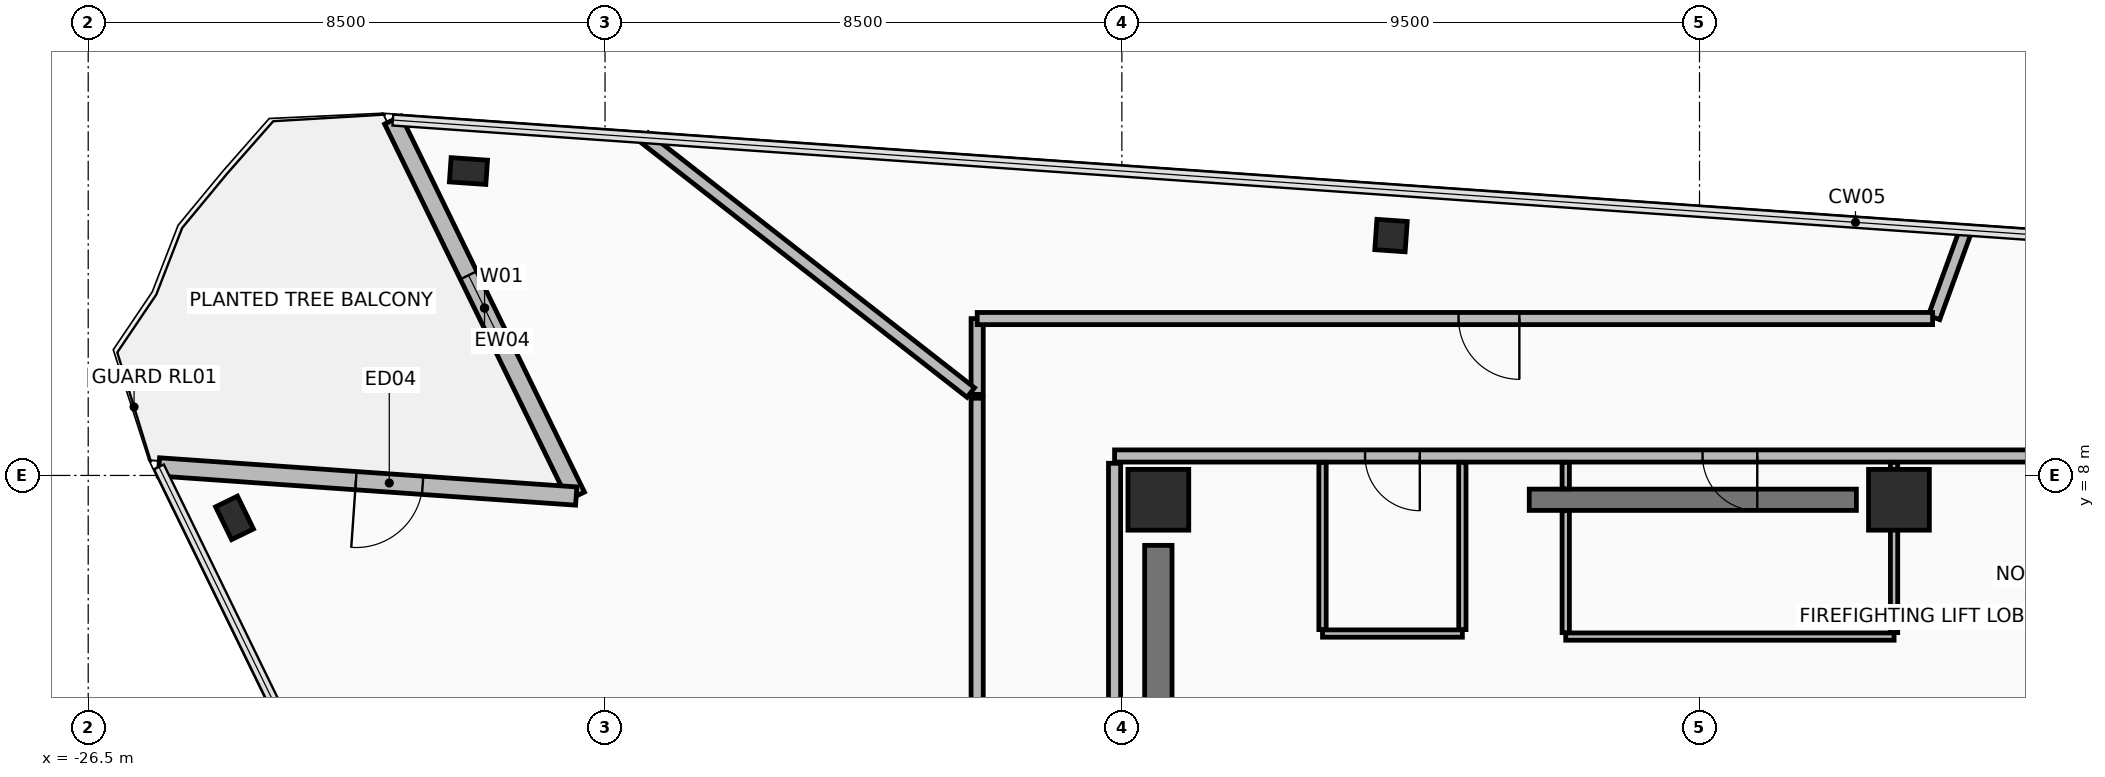
"""IFC4 building model, lengths in metres.
Left out: names, types, materials, properties, quantities, classifications, styles, units other than length and angle.
Written with IfcOpenShell. Run it as: python <this file> out.ifc"""

import sys

from ifc_helpers import new_model, si_unit, direction, frame, frame_2d, origin, origin_2d, place, context, subcontext, project, spatial, rectangle, hollow_rectangle, extrude, element, fill, save


model = new_model("IFC4")
c1 = context("Model", 3, precision=1e-05, world=origin(), true_north=direction((0.0, 1.0)))
c2 = subcontext(c1, "Body", "Model", "MODEL_VIEW")
j1 = project(units=[si_unit("LENGTHUNIT", "METRE"), si_unit("PLANEANGLEUNIT", "RADIAN")], contexts=[c1])
p1 = place(None, origin())
s1 = spatial("IfcSite", under=j1, at=p1, CompositionType="ELEMENT")
p2 = place(p1, origin())
s2 = spatial("IfcBuilding", under=s1, at=p2, CompositionType="ELEMENT")
p3 = place(p2, frame((0.0, 0.0, 230.65)))
s3 = spatial("IfcBuildingStorey", under=s2, at=p3, CompositionType="ELEMENT", Elevation=230.65)
for number, where, z_axis, x_axis in (
    (1, (3.28, 7.6, 0.0), (0.0, 0.0, 1.0), (1.0, 0.0, 0.0)),
    (2, (-8.9, 7.6, 0.0), (0.0, 0.0, 1.0), (1.0, 0.0, 0.0)),
):
    element("IfcColumn", number, at=place(p3, frame(where, z_axis=z_axis, x_axis=x_axis)), inside=s3, PredefinedType="COLUMN", context=c2, shape_type="SweptSolid", body=[
        extrude(rectangle(XDim=1.0, YDim=1.0, at=origin_2d()), origin(), (0.0, 0.0, 1.0), 3.6),
    ])
p4 = place(p3, frame((-24.094, 7.302, 0.0), z_axis=(0.0, 0.0, 1.0), x_axis=(-0.438371146789, 0.898794046299, 0.0)))
e3 = element("IfcColumn", 3, at=p4, inside=s3, PredefinedType="COLUMN", context=c2, shape_type="SweptSolid", body=[
    extrude(hollow_rectangle(XDim=0.4, YDim=0.6, WallThickness=0.03, at=origin_2d()), origin(), (0.0, 0.0, 1.0), 3.6),
])
p5 = place(p3, frame((-5.073, 11.945, 0.0), z_axis=(0.0, 0.0, 1.0), x_axis=(-0.99756405026, 0.069756473744, 0.0)))
e4 = element("IfcColumn", 4, at=p5, inside=s3, PredefinedType="COLUMN", context=c2, shape_type="SweptSolid", body=[
    extrude(hollow_rectangle(XDim=0.5, YDim=0.5, WallThickness=0.032, at=origin_2d()), origin(), (0.0, 0.0, 1.0), 3.6),
])
p6 = place(p3, frame((-20.246, 13.006, 0.0), z_axis=(0.0, 0.0, 1.0), x_axis=(-0.99756405026, 0.069756473744, 0.0)))
e5 = element("IfcColumn", 5, at=p6, inside=s3, PredefinedType="COLUMN", context=c2, shape_type="SweptSolid", body=[
    extrude(hollow_rectangle(XDim=0.4, YDim=0.6, WallThickness=0.03, at=origin_2d()), origin(), (0.0, 0.0, 1.0), 3.6),
])
p7 = place(p3, frame((-21.49, 13.844, 0.0), z_axis=(0.0, 0.0, 1.0), x_axis=(0.438391471143, -0.898784133165, 0.0)))
e6 = element("IfcWall", 6, at=p7, inside=s3, PredefinedType="STANDARD", context=c2, shape_type="SweptSolid", body=[
    extrude(rectangle(XDim=6.88, YDim=0.3, at=frame_2d((3.44, 0.0))), origin(), (0.0, 0.0, 1.0), 2.765),
])
p8 = place(p7, frame((2.84, 0.0, 0.485)))
e7 = element("IfcOpeningElement", 7, at=p8, cuts=e6, PredefinedType="OPENING", context=c2, shape_type="SweptSolid", body=[
    extrude(rectangle(XDim=1.2, YDim=2.1, at=frame_2d((0.6, 1.05))), frame((0.0, 0.16, 0.0), z_axis=(0.0, -1.0, 0.0), x_axis=(1.0, 0.0, 0.0)), (0.0, 0.0, 1.0), 0.32),
])
p9 = place(p3, frame((-18.474, 7.661, 0.0), z_axis=(0.0, 0.0, 1.0), x_axis=(-0.997565982203, 0.069728840176, 0.0)))
e8 = element("IfcWall", 8, at=p9, inside=s3, PredefinedType="STANDARD", context=c2, shape_type="SweptSolid", body=[
    extrude(rectangle(XDim=6.88, YDim=0.3, at=frame_2d((3.44, 0.0))), origin(), (0.0, 0.0, 1.0), 2.765),
])
p10 = place(p9, frame((2.532, 0.0, 0.0)))
e9 = element("IfcOpeningElement", 9, at=p10, cuts=e8, PredefinedType="OPENING", context=c2, shape_type="SweptSolid", body=[
    extrude(rectangle(XDim=1.1, YDim=2.2, at=frame_2d((0.55, 1.1))), frame((0.0, 0.16, 0.0), z_axis=(0.0, -1.0, 0.0), x_axis=(1.0, 0.0, 0.0)), (0.0, 0.0, 1.0), 0.32),
])
p11 = place(p3, frame((-2.8, 7.6, 0.0), z_axis=(0.0, 0.0, 1.0), x_axis=(1.0, 0.0, 0.0)))
e10 = element("IfcWall", 10, at=p11, inside=s3, PredefinedType="SHEAR", context=c2, shape_type="SweptSolid", body=[
    extrude(rectangle(XDim=5.38, YDim=0.35, at=frame_2d((2.69, 0.0))), origin(), (0.0, 0.0, 1.0), 3.42),
])
p12 = place(p3, frame((-8.9, -3.85, 0.0), z_axis=(0.0, 0.0, 1.0), x_axis=(0.0, 1.0, 0.0)))
e11 = element("IfcWall", 11, at=p12, inside=s3, PredefinedType="SHEAR", context=c2, shape_type="SweptSolid", body=[
    extrude(rectangle(XDim=10.7, YDim=0.45, at=frame_2d((5.35, 0.0))), origin(), (0.0, 0.0, 1.0), 3.42),
])
p13 = place(p3, frame((9.62, 8.32, 0.0), z_axis=(0.0, 0.0, 1.0), x_axis=(-1.0, 0.0, 0.0)))
e12 = element("IfcWall", 12, at=p13, inside=s3, PredefinedType="PARTITIONING", context=c2, shape_type="SweptSolid", body=[
    extrude(rectangle(XDim=19.24, YDim=0.2, at=frame_2d((9.62, 0.0))), origin(), (0.0, 0.0, 1.0), 2.915),
])
p14 = place(p13, frame((8.67, 0.0, 0.0)))
e13 = element("IfcOpeningElement", 13, at=p14, cuts=e12, PredefinedType="OPENING", context=c2, shape_type="SweptSolid", body=[
    extrude(rectangle(XDim=0.9, YDim=2.1, at=frame_2d((0.45, 1.05))), frame((0.0, 0.11, 0.0), z_axis=(0.0, -1.0, 0.0), x_axis=(1.0, 0.0, 0.0)), (0.0, 0.0, 1.0), 0.22),
])
p15 = place(p13, frame((14.22, 0.0, 0.0)))
e14 = element("IfcOpeningElement", 14, at=p15, cuts=e12, PredefinedType="OPENING", context=c2, shape_type="SweptSolid", body=[
    extrude(rectangle(XDim=0.9, YDim=2.1, at=frame_2d((0.45, 1.05))), frame((0.0, 0.11, 0.0), z_axis=(0.0, -1.0, 0.0), x_axis=(1.0, 0.0, 0.0)), (0.0, 0.0, 1.0), 0.22),
])
p16 = place(p3, frame((-9.62, 8.2, 0.0), z_axis=(0.0, 0.0, 1.0), x_axis=(0.0, -1.0, 0.0)))
e15 = element("IfcWall", 15, at=p16, inside=s3, PredefinedType="PARTITIONING", context=c2, shape_type="SweptSolid", body=[
    extrude(rectangle(XDim=16.4, YDim=0.2, at=frame_2d((8.2, 0.0))), origin(), (0.0, 0.0, 1.0), 2.765),
])
p17 = place(p16, frame((12.65, 0.0, 0.0)))
e16 = element("IfcOpeningElement", 16, at=p17, cuts=e15, PredefinedType="OPENING", context=c2, shape_type="SweptSolid", body=[
    extrude(rectangle(XDim=1.1, YDim=2.15, at=frame_2d((0.55, 1.075))), frame((0.0, 0.11, 0.0), z_axis=(0.0, -1.0, 0.0), x_axis=(1.0, 0.0, 0.0)), (0.0, 0.0, 1.0), 0.22),
])
p18 = place(p3, frame((-2.2, 5.35, 0.0), z_axis=(0.0, 0.0, 1.0), x_axis=(1.0, 0.0, 0.0)))
e17 = element("IfcWall", 17, at=p18, inside=s3, PredefinedType="PARTITIONING", context=c2, shape_type="SweptSolid", body=[
    extrude(rectangle(XDim=5.4, YDim=0.12, at=frame_2d((2.7, 0.0))), origin(), (0.0, 0.0, 1.0), 2.715),
])
p19 = place(p3, frame((3.2, 5.415, 0.0), z_axis=(0.0, 0.0, 1.0), x_axis=(0.0, 1.0, 0.0)))
e18 = element("IfcWall", 18, at=p19, inside=s3, PredefinedType="PARTITIONING", context=c2, shape_type="SweptSolid", body=[
    extrude(rectangle(XDim=2.8, YDim=0.12, at=frame_2d((1.4, 0.0))), origin(), (0.0, 0.0, 1.0), 2.715),
])
p20 = place(p3, frame((-2.2, 8.215, 0.0), z_axis=(0.0, 0.0, 1.0), x_axis=(0.0, -1.0, 0.0)))
e19 = element("IfcWall", 19, at=p20, inside=s3, PredefinedType="PARTITIONING", context=c2, shape_type="SweptSolid", body=[
    extrude(rectangle(XDim=0.435, YDim=0.12, at=frame_2d((0.218, 0.0))), origin(), (0.0, 0.0, 1.0), 2.715),
])
p21 = place(p3, frame((-2.2, 7.42, 0.0), z_axis=(0.0, 0.0, 1.0), x_axis=(0.0, -1.0, 0.0)))
e20 = element("IfcWall", 20, at=p21, inside=s3, PredefinedType="PARTITIONING", context=c2, shape_type="SweptSolid", body=[
    extrude(rectangle(XDim=2.005, YDim=0.12, at=frame_2d((1.002, 0.0))), origin(), (0.0, 0.0, 1.0), 2.715),
])
p22 = place(p3, frame((-6.2, 5.4, 0.0), z_axis=(0.0, 0.0, 1.0), x_axis=(1.0, 0.0, 0.0)))
e21 = element("IfcWall", 21, at=p22, inside=s3, PredefinedType="PARTITIONING", context=c2, shape_type="SweptSolid", body=[
    extrude(rectangle(XDim=2.3, YDim=0.12, at=frame_2d((1.15, 0.0))), origin(), (0.0, 0.0, 1.0), 3.42),
])
for number, where, z_axis, x_axis in (
    (22, (-3.9, 5.465, 0.0), (0.0, 0.0, 1.0), (0.0, 1.0, 0.0)),
    (23, (-6.2, 8.215, 0.0), (0.0, 0.0, 1.0), (0.0, -1.0, 0.0)),
):
    element("IfcWall", number, at=place(p3, frame(where, z_axis=z_axis, x_axis=x_axis)), inside=s3, PredefinedType="PARTITIONING", context=c2, shape_type="SweptSolid", body=[
        extrude(rectangle(XDim=2.75, YDim=0.12, at=frame_2d((1.375, 0.0))), origin(), (0.0, 0.0, 1.0), 2.715),
    ])
p23 = place(p3, frame((-11.88, 10.579, 0.0), z_axis=(0.0, 0.0, 1.0), x_axis=(0.0, -1.0, 0.0)))
e24 = element("IfcWall", 24, at=p23, inside=s3, PredefinedType="PARTITIONING", context=c2, shape_type="SweptSolid", body=[
    extrude(rectangle(XDim=1.246, YDim=0.2, at=frame_2d((0.623, 0.0))), origin(), (0.0, 0.0, 1.0), 3.42),
])
p24 = place(p3, frame((-11.985, 9.364, 0.0), z_axis=(0.0, 0.0, 1.0), x_axis=(-0.788014043204, 0.61565726481, 0.0)))
e25 = element("IfcWall", 25, at=p24, inside=s3, PredefinedType="PARTITIONING", context=c2, shape_type="SweptSolid", body=[
    extrude(rectangle(XDim=6.808, YDim=0.2, at=frame_2d((3.404, 0.0))), origin(), (0.0, 0.0, 1.0), 2.765),
])
p25 = place(p3, frame((4.381, 12.035, 0.0), z_axis=(0.0, 0.0, 1.0), x_axis=(-0.342127052105, -0.939653702285, 0.0)))
e26 = element("IfcWall", 26, at=p25, inside=s3, PredefinedType="PARTITIONING", context=c2, shape_type="SweptSolid", body=[
    extrude(rectangle(XDim=1.531, YDim=0.2, at=frame_2d((0.766, 0.0))), origin(), (0.0, 0.0, 1.0), 2.765),
])
p26 = place(p3, frame((3.833, 10.58, 0.0), z_axis=(0.0, 0.0, 1.0), x_axis=(-1.0, 0.0, 0.0)))
e27 = element("IfcWall", 27, at=p26, inside=s3, PredefinedType="PARTITIONING", context=c2, shape_type="SweptSolid", body=[
    extrude(rectangle(XDim=15.713, YDim=0.2, at=frame_2d((7.856, 0.0))), origin(), (0.0, 0.0, 1.0), 2.915),
])
p27 = place(p26, frame((6.796, 0.0, 0.0)))
e28 = element("IfcOpeningElement", 28, at=p27, cuts=e27, PredefinedType="OPENING", context=c2, shape_type="SweptSolid", body=[
    extrude(rectangle(XDim=1.0, YDim=2.15, at=frame_2d((0.5, 1.075))), frame((0.0, 0.11, 0.0), z_axis=(0.0, -1.0, 0.0), x_axis=(1.0, 0.0, 0.0)), (0.0, 0.0, 1.0), 0.22),
])
p28 = place(p3, frame((-11.88, 9.27, 0.0), z_axis=(0.0, 0.0, 1.0), x_axis=(0.0, -1.0, 0.0)))
e29 = element("IfcWall", 29, at=p28, inside=s3, PredefinedType="PARTITIONING", context=c2, shape_type="SweptSolid", body=[
    extrude(rectangle(XDim=17.27, YDim=0.2, at=frame_2d((8.635, 0.0))), origin(), (0.0, 0.0, 1.0), 2.765),
])
p29 = place(p28, frame((8.135, 0.0, 0.0)))
e30 = element("IfcOpeningElement", 30, at=p29, cuts=e29, PredefinedType="OPENING", context=c2, shape_type="SweptSolid", body=[
    extrude(rectangle(XDim=1.0, YDim=2.15, at=frame_2d((0.5, 1.075))), frame((0.0, 0.11, 0.0), z_axis=(0.0, -1.0, 0.0), x_axis=(1.0, 0.0, 0.0)), (0.0, 0.0, 1.0), 0.22),
])
p30 = place(p10, frame((1.1, 0.0, 0.0), z_axis=(0.0, 0.0, 1.0), x_axis=(-1.0, 0.0, 0.0)))
e31 = element("IfcDoor", 31, at=p30, inside=s3, OperationType="SINGLE_SWING_LEFT", PredefinedType="DOOR", context=c2, shape_type="SweptSolid", body=[
    extrude(rectangle(XDim=1.1, YDim=2.2, at=frame_2d((0.55, 1.1))), frame((0.0, 0.025, 0.0), z_axis=(0.0, -1.0, 0.0), x_axis=(1.0, 0.0, 0.0)), (0.0, 0.0, 1.0), 0.05),
])
fill(e9, e31)
p31 = place(p8, origin())
e32 = element("IfcWindow", 32, at=p31, inside=s3, PartitioningType="SINGLE_PANEL", PredefinedType="WINDOW", context=c2, shape_type="SweptSolid", body=[
    extrude(rectangle(XDim=1.2, YDim=2.1, at=frame_2d((0.6, 1.05))), frame((0.0, 0.03, 0.0), z_axis=(0.0, -1.0, 0.0), x_axis=(1.0, 0.0, 0.0)), (0.0, 0.0, 1.0), 0.06),
])
fill(e7, e32)
p32 = place(p14, origin())
e33 = element("IfcDoor", 33, at=p32, inside=s3, OperationType="SINGLE_SWING_LEFT", PredefinedType="DOOR", context=c2, shape_type="SweptSolid", body=[
    extrude(rectangle(XDim=0.9, YDim=2.1, at=frame_2d((0.45, 1.05))), frame((0.0, 0.025, 0.0), z_axis=(0.0, -1.0, 0.0), x_axis=(1.0, 0.0, 0.0)), (0.0, 0.0, 1.0), 0.05),
])
fill(e13, e33)
p33 = place(p15, origin())
e34 = element("IfcDoor", 34, at=p33, inside=s3, OperationType="SINGLE_SWING_LEFT", PredefinedType="DOOR", context=c2, shape_type="SweptSolid", body=[
    extrude(rectangle(XDim=0.9, YDim=2.1, at=frame_2d((0.45, 1.05))), frame((0.0, 0.025, 0.0), z_axis=(0.0, -1.0, 0.0), x_axis=(1.0, 0.0, 0.0)), (0.0, 0.0, 1.0), 0.05),
])
fill(e14, e34)
p34 = place(p27, origin())
e35 = element("IfcDoor", 35, at=p34, inside=s3, OperationType="SINGLE_SWING_RIGHT", PredefinedType="DOOR", context=c2, shape_type="SweptSolid", body=[
    extrude(rectangle(XDim=1.0, YDim=2.15, at=frame_2d((0.5, 1.075))), frame((0.0, 0.025, 0.0), z_axis=(0.0, -1.0, 0.0), x_axis=(1.0, 0.0, 0.0)), (0.0, 0.0, 1.0), 0.05),
])
fill(e28, e35)
save(model, sys.argv[1])
